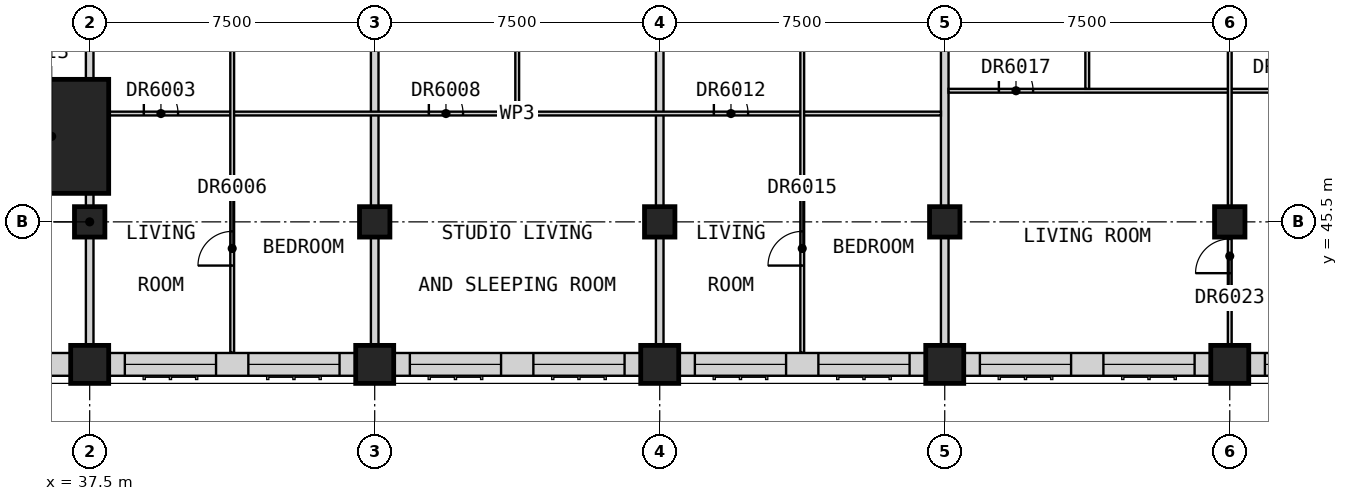
"""IFC4 building model, lengths in metres.
Left out: names, types, materials, properties, quantities, classifications, styles, units other than length and angle.
Written with IfcOpenShell. Run it as: python <this file> out.ifc"""

import sys

from ifc_helpers import new_model, si_unit, direction, frame, frame_2d, origin, origin_2d, place, context, subcontext, project, spatial, rectangle, extrude, element, fill, save


model = new_model("IFC4")
c1 = context("Model", 3, precision=1e-05, world=origin(), true_north=direction((0.0, 1.0)))
c2 = subcontext(c1, "Body", "Model", "MODEL_VIEW")
j1 = project(units=[si_unit("LENGTHUNIT", "METRE"), si_unit("PLANEANGLEUNIT", "RADIAN")], contexts=[c1])
p1 = place(None, origin())
s1 = spatial("IfcSite", under=j1, at=p1, CompositionType="ELEMENT")
p2 = place(p1, origin())
s2 = spatial("IfcBuilding", under=s1, at=p2, CompositionType="ELEMENT")
p3 = place(p2, frame((0.0, 0.0, 226.7)))
s3 = spatial("IfcBuildingStorey", under=s2, at=p3, CompositionType="ELEMENT", Elevation=226.7)
for number, where, z_axis, x_axis in (
    (1, (37.5, 41.75, 0.0), (0.0, 0.0, 1.0), (1.0, 0.0, 0.0)),
    (2, (45.0, 41.75, 0.0), (0.0, 0.0, 1.0), (1.0, 0.0, 0.0)),
    (3, (52.5, 41.75, 0.0), (0.0, 0.0, 1.0), (1.0, 0.0, 0.0)),
    (4, (60.0, 41.75, 0.0), (0.0, 0.0, 1.0), (1.0, 0.0, 0.0)),
    (5, (67.5, 41.75, 0.0), (0.0, 0.0, 1.0), (1.0, 0.0, 0.0)),
):
    element("IfcColumn", number, at=place(p3, frame(where, z_axis=z_axis, x_axis=x_axis)), inside=s3, PredefinedType="COLUMN", context=c2, shape_type="SweptSolid", body=[
        extrude(rectangle(XDim=1.0, YDim=1.0, at=origin_2d()), origin(), (0.0, 0.0, 1.0), 3.5),
    ])
for number, where, z_axis, x_axis in (
    (6, (37.5, 45.5, 0.0), (0.0, 0.0, 1.0), (1.0, 0.0, 0.0)),
    (7, (45.0, 45.5, 0.0), (0.0, 0.0, 1.0), (1.0, 0.0, 0.0)),
    (8, (52.5, 45.5, 0.0), (0.0, 0.0, 1.0), (1.0, 0.0, 0.0)),
    (9, (60.0, 45.5, 0.0), (0.0, 0.0, 1.0), (1.0, 0.0, 0.0)),
    (10, (67.5, 45.5, 0.0), (0.0, 0.0, 1.0), (1.0, 0.0, 0.0)),
):
    element("IfcColumn", number, at=place(p3, frame(where, z_axis=z_axis, x_axis=x_axis)), inside=s3, PredefinedType="COLUMN", context=c2, shape_type="SweptSolid", body=[
        extrude(rectangle(XDim=0.8, YDim=0.8, at=origin_2d()), origin(), (0.0, 0.0, 1.0), 3.5),
    ])
p4 = place(p3, frame((36.5, 47.75, 0.0), z_axis=(0.0, 0.0, 1.0), x_axis=(1.0, 0.0, 0.0)))
e11 = element("IfcColumn", 11, at=p4, inside=s3, PredefinedType="COLUMN", context=c2, shape_type="SweptSolid", body=[
    extrude(rectangle(XDim=3.0, YDim=3.0, at=origin_2d()), origin(), (0.0, 0.0, 1.0), 3.5),
])
p5 = place(p3, frame((35.0, 41.75, 0.0), z_axis=(0.0, 0.0, 1.0), x_axis=(1.0, 0.0, 0.0)))
e12 = element("IfcWall", 12, at=p5, inside=s3, PredefinedType="SOLIDWALL", context=c2, shape_type="SweptSolid", body=[
    extrude(rectangle(XDim=2.0, YDim=0.6, at=frame_2d((1.0, 0.0))), origin(), (0.0, 0.0, 1.0), 3.25),
])
p6 = place(p3, frame((38.0, 41.75, 0.0), z_axis=(0.0, 0.0, 1.0), x_axis=(1.0, 0.0, 0.0)))
e13 = element("IfcWall", 13, at=p6, inside=s3, PredefinedType="SOLIDWALL", context=c2, shape_type="SweptSolid", body=[
    extrude(rectangle(XDim=6.5, YDim=0.6, at=frame_2d((3.25, 0.0))), origin(), (0.0, 0.0, 1.0), 2.75),
])
p7 = place(p6, frame((0.425, 0.0, 0.8)))
e14 = element("IfcOpeningElement", 14, at=p7, cuts=e13, PredefinedType="OPENING", context=c2, shape_type="SweptSolid", body=[
    extrude(rectangle(XDim=2.4, YDim=1.8, at=frame_2d((1.2, 0.9))), frame((0.0, 0.31, 0.0), z_axis=(0.0, -1.0, 0.0), x_axis=(1.0, 0.0, 0.0)), (0.0, 0.0, 1.0), 0.62),
])
p8 = place(p6, frame((3.675, 0.0, 0.8)))
e15 = element("IfcOpeningElement", 15, at=p8, cuts=e13, PredefinedType="OPENING", context=c2, shape_type="SweptSolid", body=[
    extrude(rectangle(XDim=2.4, YDim=1.8, at=frame_2d((1.2, 0.9))), frame((0.0, 0.31, 0.0), z_axis=(0.0, -1.0, 0.0), x_axis=(1.0, 0.0, 0.0)), (0.0, 0.0, 1.0), 0.62),
])
p9 = place(p3, frame((45.5, 41.75, 0.0), z_axis=(0.0, 0.0, 1.0), x_axis=(1.0, 0.0, 0.0)))
e16 = element("IfcWall", 16, at=p9, inside=s3, PredefinedType="SOLIDWALL", context=c2, shape_type="SweptSolid", body=[
    extrude(rectangle(XDim=6.5, YDim=0.6, at=frame_2d((3.25, 0.0))), origin(), (0.0, 0.0, 1.0), 2.75),
])
p10 = place(p9, frame((0.425, 0.0, 0.8)))
e17 = element("IfcOpeningElement", 17, at=p10, cuts=e16, PredefinedType="OPENING", context=c2, shape_type="SweptSolid", body=[
    extrude(rectangle(XDim=2.4, YDim=1.8, at=frame_2d((1.2, 0.9))), frame((0.0, 0.31, 0.0), z_axis=(0.0, -1.0, 0.0), x_axis=(1.0, 0.0, 0.0)), (0.0, 0.0, 1.0), 0.62),
])
p11 = place(p9, frame((3.675, 0.0, 0.8)))
e18 = element("IfcOpeningElement", 18, at=p11, cuts=e16, PredefinedType="OPENING", context=c2, shape_type="SweptSolid", body=[
    extrude(rectangle(XDim=2.4, YDim=1.8, at=frame_2d((1.2, 0.9))), frame((0.0, 0.31, 0.0), z_axis=(0.0, -1.0, 0.0), x_axis=(1.0, 0.0, 0.0)), (0.0, 0.0, 1.0), 0.62),
])
p12 = place(p3, frame((53.0, 41.75, 0.0), z_axis=(0.0, 0.0, 1.0), x_axis=(1.0, 0.0, 0.0)))
e19 = element("IfcWall", 19, at=p12, inside=s3, PredefinedType="SOLIDWALL", context=c2, shape_type="SweptSolid", body=[
    extrude(rectangle(XDim=6.5, YDim=0.6, at=frame_2d((3.25, 0.0))), origin(), (0.0, 0.0, 1.0), 2.75),
])
p13 = place(p12, frame((0.425, 0.0, 0.8)))
e20 = element("IfcOpeningElement", 20, at=p13, cuts=e19, PredefinedType="OPENING", context=c2, shape_type="SweptSolid", body=[
    extrude(rectangle(XDim=2.4, YDim=1.8, at=frame_2d((1.2, 0.9))), frame((0.0, 0.31, 0.0), z_axis=(0.0, -1.0, 0.0), x_axis=(1.0, 0.0, 0.0)), (0.0, 0.0, 1.0), 0.62),
])
p14 = place(p12, frame((3.675, 0.0, 0.8)))
e21 = element("IfcOpeningElement", 21, at=p14, cuts=e19, PredefinedType="OPENING", context=c2, shape_type="SweptSolid", body=[
    extrude(rectangle(XDim=2.4, YDim=1.8, at=frame_2d((1.2, 0.9))), frame((0.0, 0.31, 0.0), z_axis=(0.0, -1.0, 0.0), x_axis=(1.0, 0.0, 0.0)), (0.0, 0.0, 1.0), 0.62),
])
p15 = place(p3, frame((60.5, 41.75, 0.0), z_axis=(0.0, 0.0, 1.0), x_axis=(1.0, 0.0, 0.0)))
e22 = element("IfcWall", 22, at=p15, inside=s3, PredefinedType="SOLIDWALL", context=c2, shape_type="SweptSolid", body=[
    extrude(rectangle(XDim=6.5, YDim=0.6, at=frame_2d((3.25, 0.0))), origin(), (0.0, 0.0, 1.0), 2.75),
])
p16 = place(p15, frame((0.425, 0.0, 0.8)))
e23 = element("IfcOpeningElement", 23, at=p16, cuts=e22, PredefinedType="OPENING", context=c2, shape_type="SweptSolid", body=[
    extrude(rectangle(XDim=2.4, YDim=1.8, at=frame_2d((1.2, 0.9))), frame((0.0, 0.31, 0.0), z_axis=(0.0, -1.0, 0.0), x_axis=(1.0, 0.0, 0.0)), (0.0, 0.0, 1.0), 0.62),
])
p17 = place(p15, frame((3.675, 0.0, 0.8)))
e24 = element("IfcOpeningElement", 24, at=p17, cuts=e22, PredefinedType="OPENING", context=c2, shape_type="SweptSolid", body=[
    extrude(rectangle(XDim=2.4, YDim=1.8, at=frame_2d((1.2, 0.9))), frame((0.0, 0.31, 0.0), z_axis=(0.0, -1.0, 0.0), x_axis=(1.0, 0.0, 0.0)), (0.0, 0.0, 1.0), 0.62),
])
p18 = place(p3, frame((68.0, 41.75, 0.0), z_axis=(0.0, 0.0, 1.0), x_axis=(1.0, 0.0, 0.0)))
e25 = element("IfcWall", 25, at=p18, inside=s3, PredefinedType="SOLIDWALL", context=c2, shape_type="SweptSolid", body=[
    extrude(rectangle(XDim=5.75, YDim=0.6, at=frame_2d((2.875, 0.0))), origin(), (0.0, 0.0, 1.0), 2.75),
])
p19 = place(p18, frame((0.425, 0.0, 0.8)))
e26 = element("IfcOpeningElement", 26, at=p19, cuts=e25, PredefinedType="OPENING", context=c2, shape_type="SweptSolid", body=[
    extrude(rectangle(XDim=2.4, YDim=1.8, at=frame_2d((1.2, 0.9))), frame((0.0, 0.31, 0.0), z_axis=(0.0, -1.0, 0.0), x_axis=(1.0, 0.0, 0.0)), (0.0, 0.0, 1.0), 0.62),
])
p20 = place(p3, frame((37.5, 41.25, 0.0), z_axis=(0.0, 0.0, 1.0), x_axis=(0.0, 1.0, 0.0)))
e27 = element("IfcWall", 27, at=p20, inside=s3, PredefinedType="PARTITIONING", context=c2, shape_type="SweptSolid", body=[
    extrude(rectangle(XDim=16.875, YDim=0.2, at=frame_2d((8.438, 0.0))), origin(), (0.0, 0.0, 1.0), 2.75),
])
for number, where, z_axis, x_axis in (
    (28, (45.0, 41.25, 0.0), (0.0, 0.0, 1.0), (0.0, 1.0, 0.0)),
    (29, (52.5, 41.25, 0.0), (0.0, 0.0, 1.0), (0.0, 1.0, 0.0)),
    (30, (60.0, 41.25, 0.0), (0.0, 0.0, 1.0), (0.0, 1.0, 0.0)),
):
    element("IfcWall", number, at=place(p3, frame(where, z_axis=z_axis, x_axis=x_axis)), inside=s3, PredefinedType="PARTITIONING", context=c2, shape_type="SweptSolid", body=[
        extrude(rectangle(XDim=16.875, YDim=0.2, at=frame_2d((8.438, 0.0))), origin(), (0.0, 0.0, 1.0), 3.25),
    ])
p21 = place(p3, frame((37.6, 48.35, 0.0), z_axis=(0.0, 0.0, 1.0), x_axis=(1.0, 0.0, 0.0)))
e31 = element("IfcWall", 31, at=p21, inside=s3, PredefinedType="PARTITIONING", context=c2, shape_type="SweptSolid", body=[
    extrude(rectangle(XDim=22.3, YDim=0.1, at=frame_2d((11.15, 0.0))), origin(), (0.0, 0.0, 1.0), 3.25),
])
p22 = place(p21, frame((1.325, 0.0, 0.0)))
e32 = element("IfcOpeningElement", 32, at=p22, cuts=e31, PredefinedType="OPENING", context=c2, shape_type="SweptSolid", body=[
    extrude(rectangle(XDim=0.9, YDim=2.1, at=frame_2d((0.45, 1.05))), frame((0.0, 0.06, 0.0), z_axis=(0.0, -1.0, 0.0), x_axis=(1.0, 0.0, 0.0)), (0.0, 0.0, 1.0), 0.12),
])
p23 = place(p21, frame((8.825, 0.0, 0.0)))
e33 = element("IfcOpeningElement", 33, at=p23, cuts=e31, PredefinedType="OPENING", context=c2, shape_type="SweptSolid", body=[
    extrude(rectangle(XDim=0.9, YDim=2.1, at=frame_2d((0.45, 1.05))), frame((0.0, 0.06, 0.0), z_axis=(0.0, -1.0, 0.0), x_axis=(1.0, 0.0, 0.0)), (0.0, 0.0, 1.0), 0.12),
])
p24 = place(p21, frame((16.325, 0.0, 0.0)))
e34 = element("IfcOpeningElement", 34, at=p24, cuts=e31, PredefinedType="OPENING", context=c2, shape_type="SweptSolid", body=[
    extrude(rectangle(XDim=0.9, YDim=2.1, at=frame_2d((0.45, 1.05))), frame((0.0, 0.06, 0.0), z_axis=(0.0, -1.0, 0.0), x_axis=(1.0, 0.0, 0.0)), (0.0, 0.0, 1.0), 0.12),
])
p25 = place(p3, frame((60.1, 48.95, 0.0), z_axis=(0.0, 0.0, 1.0), x_axis=(1.0, 0.0, 0.0)))
e35 = element("IfcWall", 35, at=p25, inside=s3, PredefinedType="PARTITIONING", context=c2, shape_type="SweptSolid", body=[
    extrude(rectangle(XDim=17.84, YDim=0.1, at=frame_2d((8.92, 0.0))), origin(), (0.0, 0.0, 1.0), 3.25),
])
p26 = place(p25, frame((1.325, 0.0, 0.0)))
e36 = element("IfcOpeningElement", 36, at=p26, cuts=e35, PredefinedType="OPENING", context=c2, shape_type="SweptSolid", body=[
    extrude(rectangle(XDim=0.9, YDim=2.1, at=frame_2d((0.45, 1.05))), frame((0.0, 0.06, 0.0), z_axis=(0.0, -1.0, 0.0), x_axis=(1.0, 0.0, 0.0)), (0.0, 0.0, 1.0), 0.12),
])
p27 = place(p25, frame((8.475, 0.0, 0.0)))
e37 = element("IfcOpeningElement", 37, at=p27, cuts=e35, PredefinedType="OPENING", context=c2, shape_type="SweptSolid", body=[
    extrude(rectangle(XDim=0.9, YDim=2.1, at=frame_2d((0.45, 1.05))), frame((0.0, 0.06, 0.0), z_axis=(0.0, -1.0, 0.0), x_axis=(1.0, 0.0, 0.0)), (0.0, 0.0, 1.0), 0.12),
])
p28 = place(p25, frame((13.725, 0.0, 0.0)))
e38 = element("IfcOpeningElement", 38, at=p28, cuts=e35, PredefinedType="OPENING", context=c2, shape_type="SweptSolid", body=[
    extrude(rectangle(XDim=0.9, YDim=2.1, at=frame_2d((0.45, 1.05))), frame((0.0, 0.06, 0.0), z_axis=(0.0, -1.0, 0.0), x_axis=(1.0, 0.0, 0.0)), (0.0, 0.0, 1.0), 0.12),
])
p29 = place(p25, frame((16.325, 0.0, 0.0)))
e39 = element("IfcOpeningElement", 39, at=p29, cuts=e35, PredefinedType="OPENING", context=c2, shape_type="SweptSolid", body=[
    extrude(rectangle(XDim=0.9, YDim=2.1, at=frame_2d((0.45, 1.05))), frame((0.0, 0.06, 0.0), z_axis=(0.0, -1.0, 0.0), x_axis=(1.0, 0.0, 0.0)), (0.0, 0.0, 1.0), 0.12),
])
p30 = place(p3, frame((41.25, 42.06, 0.0), z_axis=(0.0, 0.0, 1.0), x_axis=(0.0, 1.0, 0.0)))
e40 = element("IfcWall", 40, at=p30, inside=s3, PredefinedType="PARTITIONING", context=c2, shape_type="SweptSolid", body=[
    extrude(rectangle(XDim=11.152, YDim=0.1, at=frame_2d((5.576, 0.0))), origin(), (0.0, 0.0, 1.0), 3.25),
])
p31 = place(p30, frame((8.302, 0.0, 0.0)))
e41 = element("IfcOpeningElement", 41, at=p31, cuts=e40, PredefinedType="OPENING", context=c2, shape_type="SweptSolid", body=[
    extrude(rectangle(XDim=0.9, YDim=2.1, at=frame_2d((0.45, 1.05))), frame((0.0, 0.06, 0.0), z_axis=(0.0, -1.0, 0.0), x_axis=(1.0, 0.0, 0.0)), (0.0, 0.0, 1.0), 0.12),
])
p32 = place(p30, frame((2.29, 0.0, 0.0)))
e42 = element("IfcOpeningElement", 42, at=p32, cuts=e40, PredefinedType="OPENING", context=c2, shape_type="SweptSolid", body=[
    extrude(rectangle(XDim=0.9, YDim=2.1, at=frame_2d((0.45, 1.05))), frame((0.0, 0.06, 0.0), z_axis=(0.0, -1.0, 0.0), x_axis=(1.0, 0.0, 0.0)), (0.0, 0.0, 1.0), 0.12),
])
p33 = place(p3, frame((48.75, 48.4, 0.0), z_axis=(0.0, 0.0, 1.0), x_axis=(0.0, 1.0, 0.0)))
e43 = element("IfcWall", 43, at=p33, inside=s3, PredefinedType="PARTITIONING", context=c2, shape_type="SweptSolid", body=[
    extrude(rectangle(XDim=4.812, YDim=0.1, at=frame_2d((2.406, 0.0))), origin(), (0.0, 0.0, 1.0), 3.25),
])
p34 = place(p33, frame((1.962, 0.0, 0.0)))
e44 = element("IfcOpeningElement", 44, at=p34, cuts=e43, PredefinedType="OPENING", context=c2, shape_type="SweptSolid", body=[
    extrude(rectangle(XDim=0.9, YDim=2.1, at=frame_2d((0.45, 1.05))), frame((0.0, 0.06, 0.0), z_axis=(0.0, -1.0, 0.0), x_axis=(1.0, 0.0, 0.0)), (0.0, 0.0, 1.0), 0.12),
])
p35 = place(p3, frame((56.25, 42.06, 0.0), z_axis=(0.0, 0.0, 1.0), x_axis=(0.0, 1.0, 0.0)))
e45 = element("IfcWall", 45, at=p35, inside=s3, PredefinedType="PARTITIONING", context=c2, shape_type="SweptSolid", body=[
    extrude(rectangle(XDim=11.152, YDim=0.1, at=frame_2d((5.576, 0.0))), origin(), (0.0, 0.0, 1.0), 3.25),
])
p36 = place(p35, frame((8.302, 0.0, 0.0)))
e46 = element("IfcOpeningElement", 46, at=p36, cuts=e45, PredefinedType="OPENING", context=c2, shape_type="SweptSolid", body=[
    extrude(rectangle(XDim=0.9, YDim=2.1, at=frame_2d((0.45, 1.05))), frame((0.0, 0.06, 0.0), z_axis=(0.0, -1.0, 0.0), x_axis=(1.0, 0.0, 0.0)), (0.0, 0.0, 1.0), 0.12),
])
p37 = place(p35, frame((2.29, 0.0, 0.0)))
e47 = element("IfcOpeningElement", 47, at=p37, cuts=e45, PredefinedType="OPENING", context=c2, shape_type="SweptSolid", body=[
    extrude(rectangle(XDim=0.9, YDim=2.1, at=frame_2d((0.45, 1.05))), frame((0.0, 0.06, 0.0), z_axis=(0.0, -1.0, 0.0), x_axis=(1.0, 0.0, 0.0)), (0.0, 0.0, 1.0), 0.12),
])
p38 = place(p3, frame((63.75, 49.0, 0.0), z_axis=(0.0, 0.0, 1.0), x_axis=(0.0, 1.0, 0.0)))
e48 = element("IfcWall", 48, at=p38, inside=s3, PredefinedType="PARTITIONING", context=c2, shape_type="SweptSolid", body=[
    extrude(rectangle(XDim=5.413, YDim=0.1, at=frame_2d((2.706, 0.0))), origin(), (0.0, 0.0, 1.0), 3.25),
])
p39 = place(p38, frame((2.262, 0.0, 0.0)))
e49 = element("IfcOpeningElement", 49, at=p39, cuts=e48, PredefinedType="OPENING", context=c2, shape_type="SweptSolid", body=[
    extrude(rectangle(XDim=0.9, YDim=2.1, at=frame_2d((0.45, 1.05))), frame((0.0, 0.06, 0.0), z_axis=(0.0, -1.0, 0.0), x_axis=(1.0, 0.0, 0.0)), (0.0, 0.0, 1.0), 0.12),
])
p40 = place(p3, frame((67.5, 41.25, 0.0), z_axis=(0.0, 0.0, 1.0), x_axis=(0.0, 1.0, 0.0)))
e50 = element("IfcWall", 50, at=p40, inside=s3, PredefinedType="PARTITIONING", context=c2, shape_type="SweptSolid", body=[
    extrude(rectangle(XDim=13.163, YDim=0.1, at=frame_2d((6.581, 0.0))), origin(), (0.0, 0.0, 1.0), 3.25),
])
p41 = place(p40, frame((2.9, 0.0, 0.0)))
e51 = element("IfcOpeningElement", 51, at=p41, cuts=e50, PredefinedType="OPENING", context=c2, shape_type="SweptSolid", body=[
    extrude(rectangle(XDim=0.9, YDim=2.1, at=frame_2d((0.45, 1.05))), frame((0.0, 0.06, 0.0), z_axis=(0.0, -1.0, 0.0), x_axis=(1.0, 0.0, 0.0)), (0.0, 0.0, 1.0), 0.12),
])
p42 = place(p7, origin())
e52 = element("IfcWindow", 52, at=p42, inside=s3, PartitioningType="SINGLE_PANEL", PredefinedType="WINDOW", context=c2, shape_type="SweptSolid", body=[
    extrude(rectangle(XDim=2.4, YDim=1.8, at=frame_2d((1.2, 0.9))), frame((0.0, -0.07, 0.0), z_axis=(0.0, -1.0, 0.0), x_axis=(1.0, 0.0, 0.0)), (0.0, 0.0, 1.0), 0.06),
])
fill(e14, e52)
p43 = place(p8, origin())
e53 = element("IfcWindow", 53, at=p43, inside=s3, PartitioningType="SINGLE_PANEL", PredefinedType="WINDOW", context=c2, shape_type="SweptSolid", body=[
    extrude(rectangle(XDim=2.4, YDim=1.8, at=frame_2d((1.2, 0.9))), frame((0.0, -0.07, 0.0), z_axis=(0.0, -1.0, 0.0), x_axis=(1.0, 0.0, 0.0)), (0.0, 0.0, 1.0), 0.06),
])
fill(e15, e53)
p44 = place(p10, origin())
e54 = element("IfcWindow", 54, at=p44, inside=s3, PartitioningType="SINGLE_PANEL", PredefinedType="WINDOW", context=c2, shape_type="SweptSolid", body=[
    extrude(rectangle(XDim=2.4, YDim=1.8, at=frame_2d((1.2, 0.9))), frame((0.0, -0.07, 0.0), z_axis=(0.0, -1.0, 0.0), x_axis=(1.0, 0.0, 0.0)), (0.0, 0.0, 1.0), 0.06),
])
fill(e17, e54)
p45 = place(p11, origin())
e55 = element("IfcWindow", 55, at=p45, inside=s3, PartitioningType="SINGLE_PANEL", PredefinedType="WINDOW", context=c2, shape_type="SweptSolid", body=[
    extrude(rectangle(XDim=2.4, YDim=1.8, at=frame_2d((1.2, 0.9))), frame((0.0, -0.07, 0.0), z_axis=(0.0, -1.0, 0.0), x_axis=(1.0, 0.0, 0.0)), (0.0, 0.0, 1.0), 0.06),
])
fill(e18, e55)
p46 = place(p13, origin())
e56 = element("IfcWindow", 56, at=p46, inside=s3, PartitioningType="SINGLE_PANEL", PredefinedType="WINDOW", context=c2, shape_type="SweptSolid", body=[
    extrude(rectangle(XDim=2.4, YDim=1.8, at=frame_2d((1.2, 0.9))), frame((0.0, -0.07, 0.0), z_axis=(0.0, -1.0, 0.0), x_axis=(1.0, 0.0, 0.0)), (0.0, 0.0, 1.0), 0.06),
])
fill(e20, e56)
p47 = place(p14, origin())
e57 = element("IfcWindow", 57, at=p47, inside=s3, PartitioningType="SINGLE_PANEL", PredefinedType="WINDOW", context=c2, shape_type="SweptSolid", body=[
    extrude(rectangle(XDim=2.4, YDim=1.8, at=frame_2d((1.2, 0.9))), frame((0.0, -0.07, 0.0), z_axis=(0.0, -1.0, 0.0), x_axis=(1.0, 0.0, 0.0)), (0.0, 0.0, 1.0), 0.06),
])
fill(e21, e57)
p48 = place(p16, origin())
e58 = element("IfcWindow", 58, at=p48, inside=s3, PartitioningType="SINGLE_PANEL", PredefinedType="WINDOW", context=c2, shape_type="SweptSolid", body=[
    extrude(rectangle(XDim=2.4, YDim=1.8, at=frame_2d((1.2, 0.9))), frame((0.0, -0.07, 0.0), z_axis=(0.0, -1.0, 0.0), x_axis=(1.0, 0.0, 0.0)), (0.0, 0.0, 1.0), 0.06),
])
fill(e23, e58)
p49 = place(p17, origin())
e59 = element("IfcWindow", 59, at=p49, inside=s3, PartitioningType="SINGLE_PANEL", PredefinedType="WINDOW", context=c2, shape_type="SweptSolid", body=[
    extrude(rectangle(XDim=2.4, YDim=1.8, at=frame_2d((1.2, 0.9))), frame((0.0, -0.07, 0.0), z_axis=(0.0, -1.0, 0.0), x_axis=(1.0, 0.0, 0.0)), (0.0, 0.0, 1.0), 0.06),
])
fill(e24, e59)
p50 = place(p19, origin())
e60 = element("IfcWindow", 60, at=p50, inside=s3, PartitioningType="SINGLE_PANEL", PredefinedType="WINDOW", context=c2, shape_type="SweptSolid", body=[
    extrude(rectangle(XDim=2.4, YDim=1.8, at=frame_2d((1.2, 0.9))), frame((0.0, -0.07, 0.0), z_axis=(0.0, -1.0, 0.0), x_axis=(1.0, 0.0, 0.0)), (0.0, 0.0, 1.0), 0.06),
])
fill(e26, e60)
p51 = place(p22, origin())
e61 = element("IfcDoor", 61, at=p51, inside=s3, OperationType="SINGLE_SWING_LEFT", PredefinedType="DOOR", context=c2, shape_type="SweptSolid", body=[
    extrude(rectangle(XDim=0.9, YDim=2.1, at=frame_2d((0.45, 1.05))), frame((0.0, 0.025, 0.0), z_axis=(0.0, -1.0, 0.0), x_axis=(1.0, 0.0, 0.0)), (0.0, 0.0, 1.0), 0.05),
])
fill(e32, e61)
p52 = place(p32, origin())
e62 = element("IfcDoor", 62, at=p52, inside=s3, OperationType="SINGLE_SWING_LEFT", PredefinedType="DOOR", context=c2, shape_type="SweptSolid", body=[
    extrude(rectangle(XDim=0.9, YDim=2.1, at=frame_2d((0.45, 1.05))), frame((0.0, 0.025, 0.0), z_axis=(0.0, -1.0, 0.0), x_axis=(1.0, 0.0, 0.0)), (0.0, 0.0, 1.0), 0.05),
])
fill(e42, e62)
p53 = place(p23, origin())
e63 = element("IfcDoor", 63, at=p53, inside=s3, OperationType="SINGLE_SWING_LEFT", PredefinedType="DOOR", context=c2, shape_type="SweptSolid", body=[
    extrude(rectangle(XDim=0.9, YDim=2.1, at=frame_2d((0.45, 1.05))), frame((0.0, 0.025, 0.0), z_axis=(0.0, -1.0, 0.0), x_axis=(1.0, 0.0, 0.0)), (0.0, 0.0, 1.0), 0.05),
])
fill(e33, e63)
p54 = place(p24, origin())
e64 = element("IfcDoor", 64, at=p54, inside=s3, OperationType="SINGLE_SWING_LEFT", PredefinedType="DOOR", context=c2, shape_type="SweptSolid", body=[
    extrude(rectangle(XDim=0.9, YDim=2.1, at=frame_2d((0.45, 1.05))), frame((0.0, 0.025, 0.0), z_axis=(0.0, -1.0, 0.0), x_axis=(1.0, 0.0, 0.0)), (0.0, 0.0, 1.0), 0.05),
])
fill(e34, e64)
p55 = place(p37, origin())
e65 = element("IfcDoor", 65, at=p55, inside=s3, OperationType="SINGLE_SWING_LEFT", PredefinedType="DOOR", context=c2, shape_type="SweptSolid", body=[
    extrude(rectangle(XDim=0.9, YDim=2.1, at=frame_2d((0.45, 1.05))), frame((0.0, 0.025, 0.0), z_axis=(0.0, -1.0, 0.0), x_axis=(1.0, 0.0, 0.0)), (0.0, 0.0, 1.0), 0.05),
])
fill(e47, e65)
p56 = place(p26, origin())
e66 = element("IfcDoor", 66, at=p56, inside=s3, OperationType="SINGLE_SWING_LEFT", PredefinedType="DOOR", context=c2, shape_type="SweptSolid", body=[
    extrude(rectangle(XDim=0.9, YDim=2.1, at=frame_2d((0.45, 1.05))), frame((0.0, 0.025, 0.0), z_axis=(0.0, -1.0, 0.0), x_axis=(1.0, 0.0, 0.0)), (0.0, 0.0, 1.0), 0.05),
])
fill(e36, e66)
p57 = place(p41, origin())
e67 = element("IfcDoor", 67, at=p57, inside=s3, OperationType="SINGLE_SWING_LEFT", PredefinedType="DOOR", context=c2, shape_type="SweptSolid", body=[
    extrude(rectangle(XDim=0.9, YDim=2.1, at=frame_2d((0.45, 1.05))), frame((0.0, 0.025, 0.0), z_axis=(0.0, -1.0, 0.0), x_axis=(1.0, 0.0, 0.0)), (0.0, 0.0, 1.0), 0.05),
])
fill(e51, e67)
save(model, sys.argv[1])
